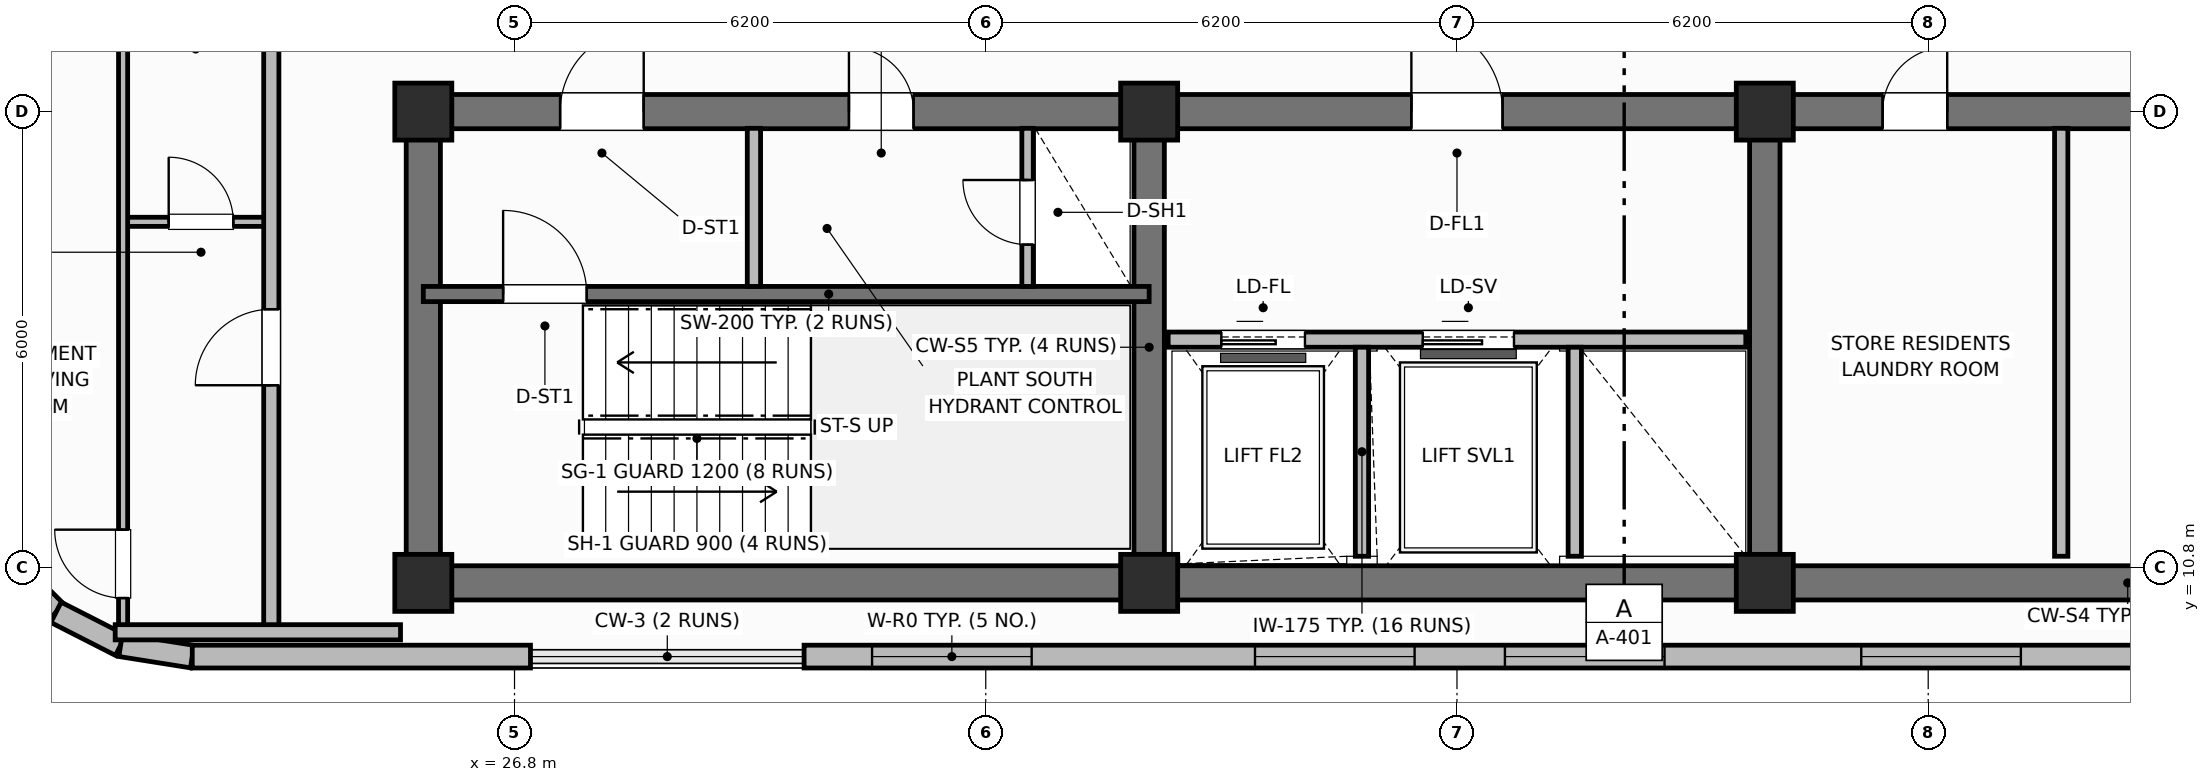
"""IFC4 building model, lengths in metres.
Left out: names, types, materials, properties, quantities, classifications, styles, units other than length and angle.
Written with IfcOpenShell. Run it as: python <this file> out.ifc"""

import sys

from ifc_helpers import new_model, si_unit, direction, frame, frame_2d, origin, origin_2d, place, context, subcontext, project, spatial, rectangle, extrude, element, fill, save


model = new_model("IFC4")
c1 = context("Model", 3, precision=1e-05, world=origin(), true_north=direction((0.0, 1.0)))
c2 = subcontext(c1, "Body", "Model", "MODEL_VIEW")
j1 = project(units=[si_unit("LENGTHUNIT", "METRE"), si_unit("PLANEANGLEUNIT", "RADIAN")], contexts=[c1])
p1 = place(None, origin())
s1 = spatial("IfcSite", under=j1, at=p1, CompositionType="ELEMENT")
p2 = place(p1, origin())
s2 = spatial("IfcBuilding", under=s1, at=p2, CompositionType="ELEMENT")
p3 = place(p2, frame((0.0, 0.0, 275.0)))
s3 = spatial("IfcBuildingStorey", under=s2, at=p3, CompositionType="ELEMENT", Elevation=275.0)
p4 = place(p3, frame((52.8, 10.6, 0.0), z_axis=(0.0, 0.0, 1.0), x_axis=(-1.0, 0.0, 0.0)))
e1 = element("IfcWall", 1, at=p4, inside=s3, PredefinedType="SHEAR", context=c2, shape_type="SweptSolid", body=[
    extrude(rectangle(XDim=27.2, YDim=0.45, at=frame_2d((13.6, 0.0))), origin(), (0.0, 0.0, 1.0), 3.7),
])
p5 = place(p3, frame((25.6, 10.825, 0.0), z_axis=(0.0, 0.0, 1.0), x_axis=(0.0, 1.0, 0.0)))
e2 = element("IfcWall", 2, at=p5, inside=s3, PredefinedType="SHEAR", context=c2, shape_type="SweptSolid", body=[
    extrude(rectangle(XDim=5.75, YDim=0.45, at=frame_2d((2.875, 0.0))), origin(), (0.0, 0.0, 1.0), 3.7),
])
p6 = place(p3, frame((25.6, 16.8, 0.0), z_axis=(0.0, 0.0, 1.0), x_axis=(1.0, 0.0, 0.0)))
e3 = element("IfcWall", 3, at=p6, inside=s3, PredefinedType="SHEAR", context=c2, shape_type="SweptSolid", body=[
    extrude(rectangle(XDim=27.2, YDim=0.45, at=frame_2d((13.6, 0.0))), origin(), (0.0, 0.0, 1.0), 3.7),
])
p7 = place(p6, frame((1.8, 0.0, 0.0)))
e4 = element("IfcOpeningElement", 4, at=p7, cuts=e3, PredefinedType="OPENING", context=c2, shape_type="SweptSolid", body=[
    extrude(rectangle(XDim=1.1, YDim=2.15, at=frame_2d((0.55, 1.075))), frame((0.0, 0.235, 0.0), z_axis=(0.0, -1.0, 0.0), x_axis=(1.0, 0.0, 0.0)), (0.0, 0.0, 1.0), 0.47),
])
p8 = place(p6, frame((5.6, 0.0, 0.0)))
e5 = element("IfcOpeningElement", 5, at=p8, cuts=e3, PredefinedType="OPENING", context=c2, shape_type="SweptSolid", body=[
    extrude(rectangle(XDim=0.85, YDim=2.1, at=frame_2d((0.425, 1.05))), frame((0.0, 0.235, 0.0), z_axis=(0.0, -1.0, 0.0), x_axis=(1.0, 0.0, 0.0)), (0.0, 0.0, 1.0), 0.47),
])
p9 = place(p6, frame((13.0, 0.0, 0.0)))
e6 = element("IfcOpeningElement", 6, at=p9, cuts=e3, PredefinedType="OPENING", context=c2, shape_type="SweptSolid", body=[
    extrude(rectangle(XDim=1.2, YDim=2.15, at=frame_2d((0.6, 1.075))), frame((0.0, 0.235, 0.0), z_axis=(0.0, -1.0, 0.0), x_axis=(1.0, 0.0, 0.0)), (0.0, 0.0, 1.0), 0.47),
])
p10 = place(p6, frame((19.2, 0.0, 0.0)))
e7 = element("IfcOpeningElement", 7, at=p10, cuts=e3, PredefinedType="OPENING", context=c2, shape_type="SweptSolid", body=[
    extrude(rectangle(XDim=0.85, YDim=2.1, at=frame_2d((0.425, 1.05))), frame((0.0, 0.235, 0.0), z_axis=(0.0, -1.0, 0.0), x_axis=(1.0, 0.0, 0.0)), (0.0, 0.0, 1.0), 0.47),
])
p11 = place(p6, frame((23.8, 0.0, 0.0)))
e8 = element("IfcOpeningElement", 8, at=p11, cuts=e3, PredefinedType="OPENING", context=c2, shape_type="SweptSolid", body=[
    extrude(rectangle(XDim=0.9, YDim=2.1, at=frame_2d((0.45, 1.05))), frame((0.0, 0.235, 0.0), z_axis=(0.0, -1.0, 0.0), x_axis=(1.0, 0.0, 0.0)), (0.0, 0.0, 1.0), 0.47),
])
for number, where, z_axis, x_axis in (
    (9, (35.15, 10.825, 0.0), (0.0, 0.0, 1.0), (0.0, 1.0, 0.0)),
    (10, (43.25, 10.825, 0.0), (0.0, 0.0, 1.0), (0.0, 1.0, 0.0)),
):
    element("IfcWall", number, at=place(p3, frame(where, z_axis=z_axis, x_axis=x_axis)), inside=s3, PredefinedType="SHEAR", context=c2, shape_type="SweptSolid", body=[
        extrude(rectangle(XDim=5.75, YDim=0.4, at=frame_2d((2.875, 0.0))), origin(), (0.0, 0.0, 1.0), 3.7),
    ])
for number, where, z_axis, x_axis in (
    (11, (25.6, 10.6, 0.0), (0.0, 0.0, 1.0), (1.0, 0.0, 0.0)),
    (12, (25.6, 16.8, 0.0), (0.0, 0.0, 1.0), (1.0, 0.0, 0.0)),
    (13, (35.15, 10.6, 0.0), (0.0, 0.0, 1.0), (1.0, 0.0, 0.0)),
    (14, (35.15, 16.8, 0.0), (0.0, 0.0, 1.0), (1.0, 0.0, 0.0)),
    (15, (43.25, 10.6, 0.0), (0.0, 0.0, 1.0), (1.0, 0.0, 0.0)),
    (16, (43.25, 16.8, 0.0), (0.0, 0.0, 1.0), (1.0, 0.0, 0.0)),
):
    element("IfcColumn", number, at=place(p3, frame(where, z_axis=z_axis, x_axis=x_axis)), inside=s3, PredefinedType="COLUMN", context=c2, shape_type="SweptSolid", body=[
        extrude(rectangle(XDim=0.75, YDim=0.75, at=origin_2d()), origin(), (0.0, 0.0, 1.0), 3.7),
    ])
p12 = place(p3, frame((20.093, 10.887, 0.0), z_axis=(0.0, 0.0, 1.0), x_axis=(0.707106781187, -0.707106781187, 0.0)))
e17 = element("IfcWall", 17, at=p12, inside=s3, PredefinedType="SOLIDWALL", context=c2, shape_type="SweptSolid", body=[
    extrude(rectangle(XDim=0.954, YDim=0.3, at=frame_2d((0.477, 0.0))), origin(), (0.0, 0.0, 1.0), 2.73),
])
p13 = place(p3, frame((20.767, 10.212, 0.0), z_axis=(0.0, 0.0, 1.0), x_axis=(0.891023873617, -0.45395644796, 0.0)))
e18 = element("IfcWall", 18, at=p13, inside=s3, PredefinedType="SOLIDWALL", context=c2, shape_type="SweptSolid", body=[
    extrude(rectangle(XDim=0.954, YDim=0.3, at=frame_2d((0.477, 0.0))), origin(), (0.0, 0.0, 1.0), 2.73),
])
p14 = place(p3, frame((21.617, 9.779, 0.0), z_axis=(0.0, 0.0, 1.0), x_axis=(0.987669453596, -0.156553666304, 0.0)))
e19 = element("IfcWall", 19, at=p14, inside=s3, PredefinedType="SOLIDWALL", context=c2, shape_type="SweptSolid", body=[
    extrude(rectangle(XDim=0.954, YDim=0.3, at=frame_2d((0.477, 0.0))), origin(), (0.0, 0.0, 1.0), 2.73),
])
p15 = place(p3, frame((22.56, 9.63, 0.0), z_axis=(0.0, 0.0, 1.0), x_axis=(1.0, 0.0, 0.0)))
e20 = element("IfcWall", 20, at=p15, inside=s3, PredefinedType="SOLIDWALL", context=c2, shape_type="SweptSolid", body=[
    extrude(rectangle(XDim=4.45, YDim=0.3, at=frame_2d((2.225, 0.0))), origin(), (0.0, 0.0, 1.0), 2.73),
])
p16 = place(p3, frame((30.61, 9.63, 0.0), z_axis=(0.0, 0.0, 1.0), x_axis=(1.0, 0.0, 0.0)))
e21 = element("IfcWall", 21, at=p16, inside=s3, PredefinedType="SOLIDWALL", context=c2, shape_type="SweptSolid", body=[
    extrude(rectangle(XDim=25.23, YDim=0.3, at=frame_2d((12.615, 0.0))), origin(), (0.0, 0.0, 1.0), 2.73),
])
p17 = place(p16, frame((0.894, 0.0, 0.71)))
e22 = element("IfcOpeningElement", 22, at=p17, cuts=e21, PredefinedType="OPENING", context=c2, shape_type="SweptSolid", body=[
    extrude(rectangle(XDim=2.1, YDim=1.9, at=frame_2d((1.05, 0.95))), frame((0.0, 0.16, 0.0), z_axis=(0.0, -1.0, 0.0), x_axis=(1.0, 0.0, 0.0)), (0.0, 0.0, 1.0), 0.32),
])
p18 = place(p16, frame((5.933, 0.0, 0.71)))
e23 = element("IfcOpeningElement", 23, at=p18, cuts=e21, PredefinedType="OPENING", context=c2, shape_type="SweptSolid", body=[
    extrude(rectangle(XDim=2.1, YDim=1.9, at=frame_2d((1.05, 0.95))), frame((0.0, 0.16, 0.0), z_axis=(0.0, -1.0, 0.0), x_axis=(1.0, 0.0, 0.0)), (0.0, 0.0, 1.0), 0.32),
])
p19 = place(p16, frame((9.221, 0.0, 0.71)))
e24 = element("IfcOpeningElement", 24, at=p19, cuts=e21, PredefinedType="OPENING", context=c2, shape_type="SweptSolid", body=[
    extrude(rectangle(XDim=2.1, YDim=1.9, at=frame_2d((1.05, 0.95))), frame((0.0, 0.16, 0.0), z_axis=(0.0, -1.0, 0.0), x_axis=(1.0, 0.0, 0.0)), (0.0, 0.0, 1.0), 0.32),
])
p20 = place(p16, frame((13.909, 0.0, 0.71)))
e25 = element("IfcOpeningElement", 25, at=p20, cuts=e21, PredefinedType="OPENING", context=c2, shape_type="SweptSolid", body=[
    extrude(rectangle(XDim=2.1, YDim=1.9, at=frame_2d((1.05, 0.95))), frame((0.0, 0.16, 0.0), z_axis=(0.0, -1.0, 0.0), x_axis=(1.0, 0.0, 0.0)), (0.0, 0.0, 1.0), 0.32),
])
p21 = place(p16, frame((17.548, 0.0, 0.71)))
e26 = element("IfcOpeningElement", 26, at=p21, cuts=e21, PredefinedType="OPENING", context=c2, shape_type="SweptSolid", body=[
    extrude(rectangle(XDim=2.1, YDim=1.9, at=frame_2d((1.05, 0.95))), frame((0.0, 0.16, 0.0), z_axis=(0.0, -1.0, 0.0), x_axis=(1.0, 0.0, 0.0)), (0.0, 0.0, 1.0), 0.32),
])
p22 = place(p3, frame((25.6, 14.4, 0.0), z_axis=(0.0, 0.0, 1.0), x_axis=(1.0, 0.0, 0.0)))
e27 = element("IfcWall", 27, at=p22, inside=s3, PredefinedType="SHEAR", context=c2, shape_type="SweptSolid", body=[
    extrude(rectangle(XDim=9.55, YDim=0.2, at=frame_2d((4.775, 0.0))), origin(), (0.0, 0.0, 1.0), 3.7),
])
p23 = place(p22, frame((1.05, 0.0, 0.0)))
e28 = element("IfcOpeningElement", 28, at=p23, cuts=e27, PredefinedType="OPENING", context=c2, shape_type="SweptSolid", body=[
    extrude(rectangle(XDim=1.1, YDim=2.15, at=frame_2d((0.55, 1.075))), frame((0.0, 0.11, 0.0), z_axis=(0.0, -1.0, 0.0), x_axis=(1.0, 0.0, 0.0)), (0.0, 0.0, 1.0), 0.22),
])
p24 = place(p3, frame((29.95, 14.5, 0.0), z_axis=(0.0, 0.0, 1.0), x_axis=(0.0, 1.0, 0.0)))
e29 = element("IfcWall", 29, at=p24, inside=s3, PredefinedType="PARTITIONING", context=c2, shape_type="SweptSolid", body=[
    extrude(rectangle(XDim=2.08, YDim=0.175, at=frame_2d((1.04, 0.0))), origin(), (0.0, 0.0, 1.0), 2.56),
])
p25 = place(p3, frame((33.55, 14.5, 0.0), z_axis=(0.0, 0.0, 1.0), x_axis=(0.0, 1.0, 0.0)))
e30 = element("IfcWall", 30, at=p25, inside=s3, PredefinedType="PARTITIONING", context=c2, shape_type="SweptSolid", body=[
    extrude(rectangle(XDim=2.08, YDim=0.15, at=frame_2d((1.04, 0.0))), origin(), (0.0, 0.0, 1.0), 2.56),
])
p26 = place(p25, frame((0.55, 0.0, 0.0)))
e31 = element("IfcOpeningElement", 31, at=p26, cuts=e30, PredefinedType="OPENING", context=c2, shape_type="SweptSolid", body=[
    extrude(rectangle(XDim=0.85, YDim=2.05, at=frame_2d((0.425, 1.025))), frame((0.0, 0.085, 0.0), z_axis=(0.0, -1.0, 0.0), x_axis=(1.0, 0.0, 0.0)), (0.0, 0.0, 1.0), 0.17),
])
p27 = place(p3, frame((35.4, 13.8, 0.0), z_axis=(0.0, 0.0, 1.0), x_axis=(1.0, 0.0, 0.0)))
e32 = element("IfcWall", 32, at=p27, inside=s3, PredefinedType="PARTITIONING", context=c2, shape_type="SweptSolid", body=[
    extrude(rectangle(XDim=7.6, YDim=0.2, at=frame_2d((3.8, 0.0))), origin(), (0.0, 0.0, 1.0), 2.33),
])
p28 = place(p27, frame((0.7, 0.0, 0.0)))
e33 = element("IfcOpeningElement", 33, at=p28, cuts=e32, PredefinedType="OPENING", context=c2, shape_type="SweptSolid", body=[
    extrude(rectangle(XDim=1.1, YDim=2.15, at=frame_2d((0.55, 1.075))), frame((0.0, 0.11, 0.0), z_axis=(0.0, -1.0, 0.0), x_axis=(1.0, 0.0, 0.0)), (0.0, 0.0, 1.0), 0.22),
])
p29 = place(p27, frame((3.35, 0.0, 0.0)))
e34 = element("IfcOpeningElement", 34, at=p29, cuts=e32, PredefinedType="OPENING", context=c2, shape_type="SweptSolid", body=[
    extrude(rectangle(XDim=1.2, YDim=2.15, at=frame_2d((0.6, 1.075))), frame((0.0, 0.11, 0.0), z_axis=(0.0, -1.0, 0.0), x_axis=(1.0, 0.0, 0.0)), (0.0, 0.0, 1.0), 0.22),
])
for number, where, z_axis, x_axis in (
    (35, (37.95, 10.95, 0.0), (0.0, 0.0, 1.0), (0.0, 1.0, 0.0)),
    (36, (40.75, 10.95, 0.0), (0.0, 0.0, 1.0), (0.0, 1.0, 0.0)),
):
    element("IfcWall", number, at=place(p3, frame(where, z_axis=z_axis, x_axis=x_axis)), inside=s3, PredefinedType="PARTITIONING", context=c2, shape_type="SweptSolid", body=[
        extrude(rectangle(XDim=2.75, YDim=0.175, at=frame_2d((1.375, 0.0))), origin(), (0.0, 0.0, 1.0), 2.56),
    ])
p30 = place(p3, frame((47.15, 10.95, 0.0), z_axis=(0.0, 0.0, 1.0), x_axis=(0.0, 1.0, 0.0)))
e37 = element("IfcWall", 37, at=p30, inside=s3, PredefinedType="PARTITIONING", context=c2, shape_type="SweptSolid", body=[
    extrude(rectangle(XDim=5.63, YDim=0.175, at=frame_2d((2.815, 0.0))), origin(), (0.0, 0.0, 1.0), 2.56),
])
p31 = place(p3, frame((21.65, 15.35, 0.0), z_axis=(0.0, 0.0, 1.0), x_axis=(1.0, 0.0, 0.0)))
e38 = element("IfcWall", 38, at=p31, inside=s3, PredefinedType="PARTITIONING", context=c2, shape_type="SweptSolid", body=[
    extrude(rectangle(XDim=1.95, YDim=0.12, at=frame_2d((0.975, 0.0))), origin(), (0.0, 0.0, 1.0), 2.56),
])
p32 = place(p31, frame((0.6, 0.0, 0.0)))
e39 = element("IfcOpeningElement", 39, at=p32, cuts=e38, PredefinedType="OPENING", context=c2, shape_type="SweptSolid", body=[
    extrude(rectangle(XDim=0.85, YDim=2.1, at=frame_2d((0.425, 1.05))), frame((0.0, 0.07, 0.0), z_axis=(0.0, -1.0, 0.0), x_axis=(1.0, 0.0, 0.0)), (0.0, 0.0, 1.0), 0.14),
])
p33 = place(p3, frame((21.65, 9.99, 0.0), z_axis=(0.0, 0.0, 1.0), x_axis=(0.0, 1.0, 0.0)))
e40 = element("IfcWall", 40, at=p33, inside=s3, PredefinedType="PARTITIONING", context=c2, shape_type="SweptSolid", body=[
    extrude(rectangle(XDim=36.42, YDim=0.12, at=frame_2d((18.21, 0.0))), origin(), (0.0, 0.0, 1.0), 2.56),
])
p34 = place(p33, frame((0.41, 0.0, 0.0)))
e41 = element("IfcOpeningElement", 41, at=p34, cuts=e40, PredefinedType="OPENING", context=c2, shape_type="SweptSolid", body=[
    extrude(rectangle(XDim=0.9, YDim=2.1, at=frame_2d((0.45, 1.05))), frame((0.0, 0.07, 0.0), z_axis=(0.0, -1.0, 0.0), x_axis=(1.0, 0.0, 0.0)), (0.0, 0.0, 1.0), 0.14),
])
p35 = place(p33, frame((15.56, 0.0, 0.0)))
e42 = element("IfcOpeningElement", 42, at=p35, cuts=e40, PredefinedType="OPENING", context=c2, shape_type="SweptSolid", body=[
    extrude(rectangle(XDim=0.82, YDim=2.08, at=frame_2d((0.41, 1.04))), frame((0.0, 0.07, 0.0), z_axis=(0.0, -1.0, 0.0), x_axis=(1.0, 0.0, 0.0)), (0.0, 0.0, 1.0), 0.14),
])
p36 = place(p3, frame((23.6, 9.95, 0.0), z_axis=(0.0, 0.0, 1.0), x_axis=(0.0, 1.0, 0.0)))
e43 = element("IfcWall", 43, at=p36, inside=s3, PredefinedType="PARTITIONING", context=c2, shape_type="SweptSolid", body=[
    extrude(rectangle(XDim=36.5, YDim=0.2, at=frame_2d((18.25, 0.0))), origin(), (0.0, 0.0, 1.0), 2.56),
])
p37 = place(p36, frame((3.25, 0.0, 0.0)))
e44 = element("IfcOpeningElement", 44, at=p37, cuts=e43, PredefinedType="OPENING", context=c2, shape_type="SweptSolid", body=[
    extrude(rectangle(XDim=1.0, YDim=2.15, at=frame_2d((0.5, 1.075))), frame((0.0, 0.11, 0.0), z_axis=(0.0, -1.0, 0.0), x_axis=(1.0, 0.0, 0.0)), (0.0, 0.0, 1.0), 0.22),
])
p38 = place(p3, frame((21.546, 9.95, 0.0), z_axis=(0.0, 0.0, 1.0), x_axis=(1.0, 0.0, 0.0)))
e45 = element("IfcWall", 45, at=p38, inside=s3, PredefinedType="PARTITIONING", context=c2, shape_type="SweptSolid", body=[
    extrude(rectangle(XDim=3.754, YDim=0.2, at=frame_2d((1.877, 0.0))), origin(), (0.0, 0.0, 1.0), 2.56),
])
p39 = place(p17, origin())
e46 = element("IfcWindow", 46, at=p39, inside=s3, PartitioningType="SINGLE_PANEL", PredefinedType="WINDOW", context=c2, shape_type="SweptSolid", body=[
    extrude(rectangle(XDim=2.1, YDim=1.9, at=frame_2d((1.05, 0.95))), frame((0.0, 0.03, 0.0), z_axis=(0.0, -1.0, 0.0), x_axis=(1.0, 0.0, 0.0)), (0.0, 0.0, 1.0), 0.06),
])
fill(e22, e46)
p40 = place(p18, origin())
e47 = element("IfcWindow", 47, at=p40, inside=s3, PartitioningType="SINGLE_PANEL", PredefinedType="WINDOW", context=c2, shape_type="SweptSolid", body=[
    extrude(rectangle(XDim=2.1, YDim=1.9, at=frame_2d((1.05, 0.95))), frame((0.0, 0.03, 0.0), z_axis=(0.0, -1.0, 0.0), x_axis=(1.0, 0.0, 0.0)), (0.0, 0.0, 1.0), 0.06),
])
fill(e23, e47)
p41 = place(p19, origin())
e48 = element("IfcWindow", 48, at=p41, inside=s3, PartitioningType="SINGLE_PANEL", PredefinedType="WINDOW", context=c2, shape_type="SweptSolid", body=[
    extrude(rectangle(XDim=2.1, YDim=1.9, at=frame_2d((1.05, 0.95))), frame((0.0, 0.03, 0.0), z_axis=(0.0, -1.0, 0.0), x_axis=(1.0, 0.0, 0.0)), (0.0, 0.0, 1.0), 0.06),
])
fill(e24, e48)
p42 = place(p20, origin())
e49 = element("IfcWindow", 49, at=p42, inside=s3, PartitioningType="SINGLE_PANEL", PredefinedType="WINDOW", context=c2, shape_type="SweptSolid", body=[
    extrude(rectangle(XDim=2.1, YDim=1.9, at=frame_2d((1.05, 0.95))), frame((0.0, 0.03, 0.0), z_axis=(0.0, -1.0, 0.0), x_axis=(1.0, 0.0, 0.0)), (0.0, 0.0, 1.0), 0.06),
])
fill(e25, e49)
p43 = place(p23, origin())
e50 = element("IfcDoor", 50, at=p43, inside=s3, OperationType="SINGLE_SWING_LEFT", PredefinedType="DOOR", context=c2, shape_type="SweptSolid", body=[
    extrude(rectangle(XDim=1.1, YDim=2.15, at=frame_2d((0.55, 1.075))), frame((0.0, 0.025, 0.0), z_axis=(0.0, -1.0, 0.0), x_axis=(1.0, 0.0, 0.0)), (0.0, 0.0, 1.0), 0.05),
])
fill(e28, e50)
p44 = place(p26, origin())
e51 = element("IfcDoor", 51, at=p44, inside=s3, OperationType="SINGLE_SWING_RIGHT", PredefinedType="TRAPDOOR", context=c2, shape_type="SweptSolid", body=[
    extrude(rectangle(XDim=0.85, YDim=2.05, at=frame_2d((0.425, 1.025))), frame((0.0, 0.025, 0.0), z_axis=(0.0, -1.0, 0.0), x_axis=(1.0, 0.0, 0.0)), (0.0, 0.0, 1.0), 0.05),
])
fill(e31, e51)
p45 = place(p28, origin())
e52 = element("IfcDoor", 52, at=p45, inside=s3, OperationType="SLIDING_TO_LEFT", PredefinedType="DOOR", context=c2, shape_type="SweptSolid", body=[
    extrude(rectangle(XDim=1.1, YDim=2.15, at=frame_2d((0.55, 1.075))), frame((0.0, 0.025, 0.0), z_axis=(0.0, -1.0, 0.0), x_axis=(1.0, 0.0, 0.0)), (0.0, 0.0, 1.0), 0.05),
])
fill(e33, e52)
p46 = place(p29, origin())
e53 = element("IfcDoor", 53, at=p46, inside=s3, OperationType="SLIDING_TO_LEFT", PredefinedType="DOOR", context=c2, shape_type="SweptSolid", body=[
    extrude(rectangle(XDim=1.2, YDim=2.15, at=frame_2d((0.6, 1.075))), frame((0.0, 0.025, 0.0), z_axis=(0.0, -1.0, 0.0), x_axis=(1.0, 0.0, 0.0)), (0.0, 0.0, 1.0), 0.05),
])
fill(e34, e53)
p47 = place(p32, origin())
e54 = element("IfcDoor", 54, at=p47, inside=s3, OperationType="SINGLE_SWING_LEFT", PredefinedType="DOOR", context=c2, shape_type="SweptSolid", body=[
    extrude(rectangle(XDim=0.85, YDim=2.1, at=frame_2d((0.425, 1.05))), frame((0.0, 0.025, 0.0), z_axis=(0.0, -1.0, 0.0), x_axis=(1.0, 0.0, 0.0)), (0.0, 0.0, 1.0), 0.05),
])
fill(e39, e54)
p48 = place(p34, origin())
e55 = element("IfcDoor", 55, at=p48, inside=s3, OperationType="SINGLE_SWING_RIGHT", PredefinedType="DOOR", context=c2, shape_type="SweptSolid", body=[
    extrude(rectangle(XDim=0.9, YDim=2.1, at=frame_2d((0.45, 1.05))), frame((0.0, 0.025, 0.0), z_axis=(0.0, -1.0, 0.0), x_axis=(1.0, 0.0, 0.0)), (0.0, 0.0, 1.0), 0.05),
])
fill(e41, e55)
p49 = place(p37, origin())
e56 = element("IfcDoor", 56, at=p49, inside=s3, OperationType="SINGLE_SWING_LEFT", PredefinedType="DOOR", context=c2, shape_type="SweptSolid", body=[
    extrude(rectangle(XDim=1.0, YDim=2.15, at=frame_2d((0.5, 1.075))), frame((0.0, 0.025, 0.0), z_axis=(0.0, -1.0, 0.0), x_axis=(1.0, 0.0, 0.0)), (0.0, 0.0, 1.0), 0.05),
])
fill(e44, e56)
p50 = place(p7, origin())
e57 = element("IfcDoor", 57, at=p50, inside=s3, OperationType="SINGLE_SWING_RIGHT", PredefinedType="DOOR", context=c2, shape_type="SweptSolid", body=[
    extrude(rectangle(XDim=1.1, YDim=2.15, at=frame_2d((0.55, 1.075))), frame((0.0, 0.025, 0.0), z_axis=(0.0, -1.0, 0.0), x_axis=(1.0, 0.0, 0.0)), (0.0, 0.0, 1.0), 0.05),
])
fill(e4, e57)
p51 = place(p8, origin())
e58 = element("IfcDoor", 58, at=p51, inside=s3, OperationType="SINGLE_SWING_LEFT", PredefinedType="DOOR", context=c2, shape_type="SweptSolid", body=[
    extrude(rectangle(XDim=0.85, YDim=2.1, at=frame_2d((0.425, 1.05))), frame((0.0, 0.025, 0.0), z_axis=(0.0, -1.0, 0.0), x_axis=(1.0, 0.0, 0.0)), (0.0, 0.0, 1.0), 0.05),
])
fill(e5, e58)
p52 = place(p9, origin())
e59 = element("IfcDoor", 59, at=p52, inside=s3, OperationType="SINGLE_SWING_LEFT", PredefinedType="DOOR", context=c2, shape_type="SweptSolid", body=[
    extrude(rectangle(XDim=1.2, YDim=2.15, at=frame_2d((0.6, 1.075))), frame((0.0, 0.025, 0.0), z_axis=(0.0, -1.0, 0.0), x_axis=(1.0, 0.0, 0.0)), (0.0, 0.0, 1.0), 0.05),
])
fill(e6, e59)
p53 = place(p10, origin())
e60 = element("IfcDoor", 60, at=p53, inside=s3, OperationType="SINGLE_SWING_RIGHT", PredefinedType="DOOR", context=c2, shape_type="SweptSolid", body=[
    extrude(rectangle(XDim=0.85, YDim=2.1, at=frame_2d((0.425, 1.05))), frame((0.0, 0.025, 0.0), z_axis=(0.0, -1.0, 0.0), x_axis=(1.0, 0.0, 0.0)), (0.0, 0.0, 1.0), 0.05),
])
fill(e7, e60)
save(model, sys.argv[1])
